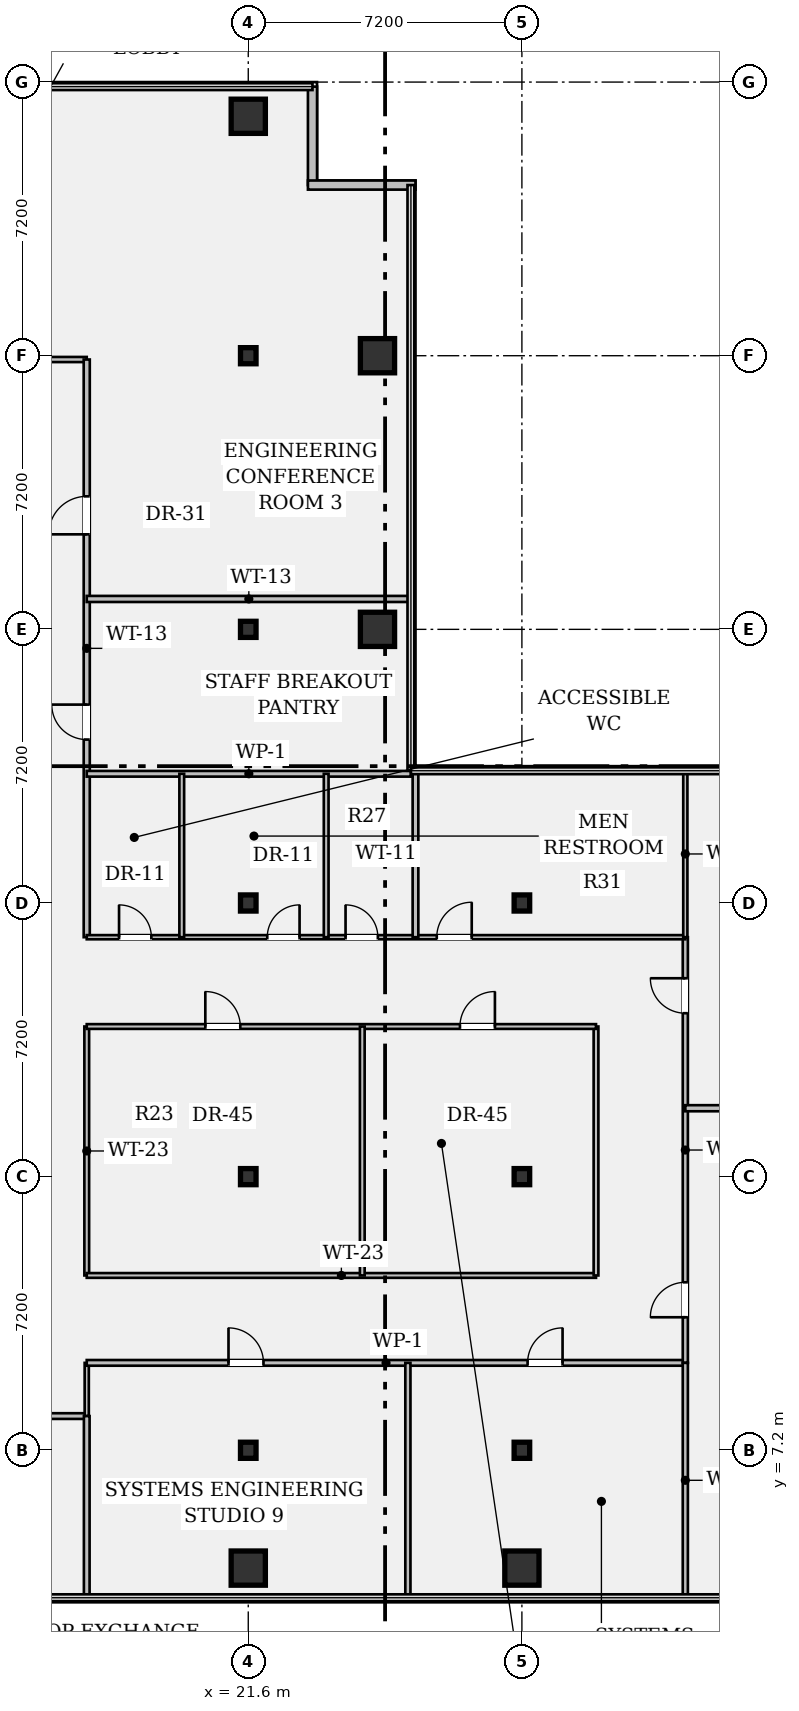
"""IFC4 building model, lengths in metres.
Left out: names, types, materials, properties, quantities, classifications, styles, units other than length and angle.
Written with IfcOpenShell. Run it as: python <this file> out.ifc"""

import sys

from ifc_helpers import new_model, si_unit, direction, frame, frame_2d, origin, origin_2d, place, context, subcontext, project, spatial, rectangle, hollow_rectangle, i_section, extrude, element, fill, save


model = new_model("IFC4")
c1 = context("Model", 3, precision=1e-05, world=origin(), true_north=direction((0.0, 1.0)))
c2 = subcontext(c1, "Body", "Model", "MODEL_VIEW")
j1 = project(units=[si_unit("LENGTHUNIT", "METRE"), si_unit("PLANEANGLEUNIT", "RADIAN")], contexts=[c1])
p1 = place(None, origin())
s1 = spatial("IfcSite", under=j1, at=p1, CompositionType="ELEMENT")
p2 = place(p1, origin())
s2 = spatial("IfcBuilding", under=s1, at=p2, CompositionType="ELEMENT")
p3 = place(p2, frame((0.0, 0.0, 140.7)))
s3 = spatial("IfcBuildingStorey", under=s2, at=p3, CompositionType="ELEMENT", Elevation=140.7)
p4 = place(p3, frame((21.6, 4.1, 0.0), z_axis=(0.0, 0.0, 1.0), x_axis=(1.0, 0.0, 0.0)))
e1 = element("IfcColumn", 1, at=p4, inside=s3, PredefinedType="COLUMN", context=c2, shape_type="SweptSolid", body=[
    extrude(hollow_rectangle(XDim=0.9, YDim=0.9, WallThickness=0.055, at=origin_2d()), origin(), (0.0, 0.0, 1.0), 3.58),
])
for number, where, z_axis, x_axis in (
    (2, (21.6, 7.2, 0.0), (0.0, 0.0, 1.0), (1.0, 0.0, 0.0)),
    (3, (21.6, 14.4, 0.0), (0.0, 0.0, 1.0), (1.0, 0.0, 0.0)),
    (4, (21.6, 21.6, 0.0), (0.0, 0.0, 1.0), (1.0, 0.0, 0.0)),
    (5, (21.6, 28.8, 0.0), (0.0, 0.0, 1.0), (1.0, 0.0, 0.0)),
    (6, (21.6, 36.0, 0.0), (0.0, 0.0, 1.0), (1.0, 0.0, 0.0)),
):
    element("IfcColumn", number, at=place(p3, frame(where, z_axis=z_axis, x_axis=x_axis)), inside=s3, PredefinedType="COLUMN", context=c2, shape_type="SweptSolid", body=[
        extrude(i_section(OverallWidth=0.409, OverallDepth=0.424, WebThickness=0.033, FlangeThickness=0.052, FilletRadius=0.018, at=origin_2d()), origin(), (0.0, 0.0, 1.0), 3.58),
    ])
for number, where, z_axis, x_axis in (
    (7, (21.6, 42.3, 0.0), (0.0, 0.0, 1.0), (1.0, 0.0, 0.0)),
    (8, (25.0, 28.8, 0.0), (0.0, 0.0, 1.0), (1.0, 0.0, 0.0)),
    (9, (25.0, 36.0, 0.0), (0.0, 0.0, 1.0), (1.0, 0.0, 0.0)),
    (10, (28.8, 4.1, 0.0), (0.0, 0.0, 1.0), (1.0, 0.0, 0.0)),
):
    element("IfcColumn", number, at=place(p3, frame(where, z_axis=z_axis, x_axis=x_axis)), inside=s3, PredefinedType="COLUMN", context=c2, shape_type="SweptSolid", body=[
        extrude(hollow_rectangle(XDim=0.9, YDim=0.9, WallThickness=0.055, at=origin_2d()), origin(), (0.0, 0.0, 1.0), 3.58),
    ])
for number, where, z_axis, x_axis in (
    (11, (28.8, 7.2, 0.0), (0.0, 0.0, 1.0), (1.0, 0.0, 0.0)),
    (12, (28.8, 14.4, 0.0), (0.0, 0.0, 1.0), (1.0, 0.0, 0.0)),
    (13, (28.8, 21.6, 0.0), (0.0, 0.0, 1.0), (1.0, 0.0, 0.0)),
):
    element("IfcColumn", number, at=place(p3, frame(where, z_axis=z_axis, x_axis=x_axis)), inside=s3, PredefinedType="COLUMN", context=c2, shape_type="SweptSolid", body=[
        extrude(i_section(OverallWidth=0.409, OverallDepth=0.424, WebThickness=0.033, FlangeThickness=0.052, FilletRadius=0.018, at=origin_2d()), origin(), (0.0, 0.0, 1.0), 3.58),
    ])
p5 = place(p3, frame((23.29, 43.08, 0.0), z_axis=(0.0, 0.0, 1.0), x_axis=(0.0, -1.0, 0.0)))
e14 = element("IfcWall", 14, at=p5, inside=s3, PredefinedType="STANDARD", context=c2, shape_type="SweptSolid", body=[
    extrude(rectangle(XDim=2.59, YDim=0.24, at=frame_2d((1.295, 0.0))), origin(), (0.0, 0.0, 1.0), 3.58),
])
p6 = place(p3, frame((23.17, 40.49, 0.0), z_axis=(0.0, 0.0, 1.0), x_axis=(1.0, 0.0, 0.0)))
e15 = element("IfcWall", 15, at=p6, inside=s3, PredefinedType="STANDARD", context=c2, shape_type="SweptSolid", body=[
    extrude(rectangle(XDim=2.83, YDim=0.24, at=frame_2d((1.415, 0.0))), origin(), (0.0, 0.0, 1.0), 3.58),
])
p7 = place(p3, frame((14.4, 8.1, 0.0), z_axis=(0.0, 0.0, 1.0), x_axis=(1.0, 0.0, 0.0)))
e16 = element("IfcWall", 16, at=p7, inside=s3, PredefinedType="PARTITIONING", context=c2, shape_type="SweptSolid", body=[
    extrude(rectangle(XDim=2.95, YDim=0.15, at=frame_2d((1.475, 0.0))), origin(), (0.0, 0.0, 1.0), 3.148),
])
p8 = place(p7, frame((0.95, 0.0, 0.0)))
e17 = element("IfcOpeningElement", 17, at=p8, cuts=e16, PredefinedType="OPENING", context=c2, shape_type="SweptSolid", body=[
    extrude(rectangle(XDim=0.92, YDim=2.15, at=frame_2d((0.46, 1.075))), frame((0.0, 0.087, 0.0), z_axis=(0.0, -1.0, 0.0), x_axis=(1.0, 0.0, 0.0)), (0.0, 0.0, 1.0), 0.174),
])
p9 = place(p3, frame((14.4, 35.9, 0.0), z_axis=(0.0, 0.0, 1.0), x_axis=(1.0, 0.0, 0.0)))
e18 = element("IfcWall", 18, at=p9, inside=s3, PredefinedType="PARTITIONING", context=c2, shape_type="SweptSolid", body=[
    extrude(rectangle(XDim=2.95, YDim=0.135, at=frame_2d((1.475, 0.0))), origin(), (0.0, 0.0, 1.0), 2.869),
])
p10 = place(p9, frame((0.95, 0.0, 0.0)))
e19 = element("IfcOpeningElement", 19, at=p10, cuts=e18, PredefinedType="OPENING", context=c2, shape_type="SweptSolid", body=[
    extrude(rectangle(XDim=1.0, YDim=2.15, at=frame_2d((0.5, 1.075))), frame((0.0, 0.08, 0.0), z_axis=(0.0, -1.0, 0.0), x_axis=(1.0, 0.0, 0.0)), (0.0, 0.0, 1.0), 0.159),
])
p11 = place(p3, frame((17.35, 8.1, 0.0), z_axis=(0.0, 0.0, 1.0), x_axis=(0.0, 1.0, 0.0)))
e20 = element("IfcWall", 20, at=p11, inside=s3, PredefinedType="PARTITIONING", context=c2, shape_type="SweptSolid", body=[
    extrude(rectangle(XDim=1.4, YDim=0.11, at=frame_2d((0.7, 0.0))), origin(), (0.0, 0.0, 1.0), 3.58),
])
p12 = place(p3, frame((17.35, 20.7, 0.0), z_axis=(0.0, 0.0, 1.0), x_axis=(0.0, 1.0, 0.0)))
e21 = element("IfcWall", 21, at=p12, inside=s3, PredefinedType="PARTITIONING", context=c2, shape_type="SweptSolid", body=[
    extrude(rectangle(XDim=15.2, YDim=0.16, at=frame_2d((7.6, 0.0))), origin(), (0.0, 0.0, 1.0), 2.869),
])
p13 = place(p12, frame((5.2, 0.0, 0.0)))
e22 = element("IfcOpeningElement", 22, at=p13, cuts=e21, PredefinedType="OPENING", context=c2, shape_type="SweptSolid", body=[
    extrude(rectangle(XDim=0.92, YDim=2.15, at=frame_2d((0.46, 1.075))), frame((0.0, 0.092, 0.0), z_axis=(0.0, -1.0, 0.0), x_axis=(1.0, 0.0, 0.0)), (0.0, 0.0, 1.0), 0.184),
])
p14 = place(p12, frame((10.6, 0.0, 0.0)))
e23 = element("IfcOpeningElement", 23, at=p14, cuts=e21, PredefinedType="OPENING", context=c2, shape_type="SweptSolid", body=[
    extrude(rectangle(XDim=1.0, YDim=2.15, at=frame_2d((0.5, 1.075))), frame((0.0, 0.092, 0.0), z_axis=(0.0, -1.0, 0.0), x_axis=(1.0, 0.0, 0.0)), (0.0, 0.0, 1.0), 0.184),
])
p15 = place(p3, frame((17.35, 9.5, 0.0), z_axis=(0.0, 0.0, 1.0), x_axis=(1.0, 0.0, 0.0)))
e24 = element("IfcWall", 24, at=p15, inside=s3, PredefinedType="PARTITIONING", context=c2, shape_type="SweptSolid", body=[
    extrude(rectangle(XDim=15.75, YDim=0.15, at=frame_2d((7.875, 0.0))), origin(), (0.0, 0.0, 1.0), 2.869),
])
p16 = place(p15, frame((3.73, 0.0, 0.0)))
e25 = element("IfcOpeningElement", 25, at=p16, cuts=e24, PredefinedType="OPENING", context=c2, shape_type="SweptSolid", body=[
    extrude(rectangle(XDim=0.92, YDim=2.15, at=frame_2d((0.46, 1.075))), frame((0.0, 0.087, 0.0), z_axis=(0.0, -1.0, 0.0), x_axis=(1.0, 0.0, 0.0)), (0.0, 0.0, 1.0), 0.174),
])
p17 = place(p15, frame((11.6, 0.0, 0.0)))
e26 = element("IfcOpeningElement", 26, at=p17, cuts=e24, PredefinedType="OPENING", context=c2, shape_type="SweptSolid", body=[
    extrude(rectangle(XDim=0.92, YDim=2.15, at=frame_2d((0.46, 1.075))), frame((0.0, 0.087, 0.0), z_axis=(0.0, -1.0, 0.0), x_axis=(1.0, 0.0, 0.0)), (0.0, 0.0, 1.0), 0.174),
])
p18 = place(p3, frame((33.1, 9.5, 0.0), z_axis=(0.0, 0.0, 1.0), x_axis=(0.0, 1.0, 0.0)))
e27 = element("IfcWall", 27, at=p18, inside=s3, PredefinedType="PARTITIONING", context=c2, shape_type="SweptSolid", body=[
    extrude(rectangle(XDim=11.2, YDim=0.135, at=frame_2d((5.6, 0.0))), origin(), (0.0, 0.0, 1.0), 2.869),
])
p19 = place(p18, frame((1.2, 0.0, 0.0)))
e28 = element("IfcOpeningElement", 28, at=p19, cuts=e27, PredefinedType="OPENING", context=c2, shape_type="SweptSolid", body=[
    extrude(rectangle(XDim=0.92, YDim=2.15, at=frame_2d((0.46, 1.075))), frame((0.0, 0.08, 0.0), z_axis=(0.0, -1.0, 0.0), x_axis=(1.0, 0.0, 0.0)), (0.0, 0.0, 1.0), 0.159),
])
p20 = place(p18, frame((9.2, 0.0, 0.0)))
e29 = element("IfcOpeningElement", 29, at=p20, cuts=e27, PredefinedType="OPENING", context=c2, shape_type="SweptSolid", body=[
    extrude(rectangle(XDim=0.92, YDim=2.15, at=frame_2d((0.46, 1.075))), frame((0.0, 0.08, 0.0), z_axis=(0.0, -1.0, 0.0), x_axis=(1.0, 0.0, 0.0)), (0.0, 0.0, 1.0), 0.159),
])
p21 = place(p3, frame((17.35, 20.7, 0.0), z_axis=(0.0, 0.0, 1.0), x_axis=(1.0, 0.0, 0.0)))
e30 = element("IfcWall", 30, at=p21, inside=s3, PredefinedType="PARTITIONING", context=c2, shape_type="SweptSolid", body=[
    extrude(rectangle(XDim=15.75, YDim=0.11, at=frame_2d((7.875, 0.0))), origin(), (0.0, 0.0, 1.0), 2.869),
])
p22 = place(p21, frame((0.85, 0.0, 0.0)))
e31 = element("IfcOpeningElement", 31, at=p22, cuts=e30, PredefinedType="OPENING", context=c2, shape_type="SweptSolid", body=[
    extrude(rectangle(XDim=0.85, YDim=2.15, at=frame_2d((0.425, 1.075))), frame((0.0, 0.067, 0.0), z_axis=(0.0, -1.0, 0.0), x_axis=(1.0, 0.0, 0.0)), (0.0, 0.0, 1.0), 0.134),
])
p23 = place(p21, frame((4.75, 0.0, 0.0)))
e32 = element("IfcOpeningElement", 32, at=p23, cuts=e30, PredefinedType="OPENING", context=c2, shape_type="SweptSolid", body=[
    extrude(rectangle(XDim=0.85, YDim=2.15, at=frame_2d((0.425, 1.075))), frame((0.0, 0.067, 0.0), z_axis=(0.0, -1.0, 0.0), x_axis=(1.0, 0.0, 0.0)), (0.0, 0.0, 1.0), 0.134),
])
p24 = place(p21, frame((6.81, 0.0, 0.0)))
e33 = element("IfcOpeningElement", 33, at=p24, cuts=e30, PredefinedType="OPENING", context=c2, shape_type="SweptSolid", body=[
    extrude(rectangle(XDim=0.85, YDim=2.15, at=frame_2d((0.425, 1.075))), frame((0.0, 0.067, 0.0), z_axis=(0.0, -1.0, 0.0), x_axis=(1.0, 0.0, 0.0)), (0.0, 0.0, 1.0), 0.134),
])
p25 = place(p21, frame((9.21, 0.0, 0.0)))
e34 = element("IfcOpeningElement", 34, at=p25, cuts=e30, PredefinedType="OPENING", context=c2, shape_type="SweptSolid", body=[
    extrude(rectangle(XDim=0.92, YDim=2.15, at=frame_2d((0.46, 1.075))), frame((0.0, 0.067, 0.0), z_axis=(0.0, -1.0, 0.0), x_axis=(1.0, 0.0, 0.0)), (0.0, 0.0, 1.0), 0.134),
])
p26 = place(p3, frame((17.35, 11.8, 0.0), z_axis=(0.0, 0.0, 1.0), x_axis=(0.0, 1.0, 0.0)))
e35 = element("IfcWall", 35, at=p26, inside=s3, PredefinedType="PARTITIONING", context=c2, shape_type="SweptSolid", body=[
    extrude(rectangle(XDim=6.55, YDim=0.125, at=frame_2d((3.275, 0.0))), origin(), (0.0, 0.0, 1.0), 2.869),
])
p27 = place(p3, frame((17.35, 11.8, 0.0), z_axis=(0.0, 0.0, 1.0), x_axis=(1.0, 0.0, 0.0)))
e36 = element("IfcWall", 36, at=p27, inside=s3, PredefinedType="PARTITIONING", context=c2, shape_type="SweptSolid", body=[
    extrude(rectangle(XDim=13.4, YDim=0.125, at=frame_2d((6.7, 0.0))), origin(), (0.0, 0.0, 1.0), 2.869),
])
p28 = place(p3, frame((30.75, 11.8, 0.0), z_axis=(0.0, 0.0, 1.0), x_axis=(0.0, 1.0, 0.0)))
e37 = element("IfcWall", 37, at=p28, inside=s3, PredefinedType="PARTITIONING", context=c2, shape_type="SweptSolid", body=[
    extrude(rectangle(XDim=6.55, YDim=0.125, at=frame_2d((3.275, 0.0))), origin(), (0.0, 0.0, 1.0), 2.869),
])
p29 = place(p3, frame((17.35, 18.35, 0.0), z_axis=(0.0, 0.0, 1.0), x_axis=(1.0, 0.0, 0.0)))
e38 = element("IfcWall", 38, at=p29, inside=s3, PredefinedType="PARTITIONING", context=c2, shape_type="SweptSolid", body=[
    extrude(rectangle(XDim=13.4, YDim=0.125, at=frame_2d((6.7, 0.0))), origin(), (0.0, 0.0, 1.0), 2.869),
])
p30 = place(p29, frame((3.12, 0.0, 0.0)))
e39 = element("IfcOpeningElement", 39, at=p30, cuts=e38, PredefinedType="OPENING", context=c2, shape_type="SweptSolid", body=[
    extrude(rectangle(XDim=0.92, YDim=2.15, at=frame_2d((0.46, 1.075))), frame((0.0, 0.074, 0.0), z_axis=(0.0, -1.0, 0.0), x_axis=(1.0, 0.0, 0.0)), (0.0, 0.0, 1.0), 0.149),
])
p31 = place(p29, frame((9.82, 0.0, 0.0)))
e40 = element("IfcOpeningElement", 40, at=p31, cuts=e38, PredefinedType="OPENING", context=c2, shape_type="SweptSolid", body=[
    extrude(rectangle(XDim=0.92, YDim=2.15, at=frame_2d((0.46, 1.075))), frame((0.0, 0.074, 0.0), z_axis=(0.0, -1.0, 0.0), x_axis=(1.0, 0.0, 0.0)), (0.0, 0.0, 1.0), 0.149),
])
p32 = place(p3, frame((24.6, 11.8, 0.0), z_axis=(0.0, 0.0, 1.0), x_axis=(0.0, 1.0, 0.0)))
e41 = element("IfcWall", 41, at=p32, inside=s3, PredefinedType="PARTITIONING", context=c2, shape_type="SweptSolid", body=[
    extrude(rectangle(XDim=6.55, YDim=0.125, at=frame_2d((3.275, 0.0))), origin(), (0.0, 0.0, 1.0), 2.869),
])
p33 = place(p3, frame((17.35, 25.0, 0.0), z_axis=(0.0, 0.0, 1.0), x_axis=(1.0, 0.0, 0.0)))
e42 = element("IfcWall", 42, at=p33, inside=s3, PredefinedType="PARTITIONING", context=c2, shape_type="SweptSolid", body=[
    extrude(rectangle(XDim=8.53, YDim=0.15, at=frame_2d((4.265, 0.0))), origin(), (0.0, 0.0, 1.0), 2.869),
])
for number, where, z_axis, x_axis in (
    (43, (19.85, 20.7, 0.0), (0.0, 0.0, 1.0), (0.0, 1.0, 0.0)),
    (44, (23.65, 20.7, 0.0), (0.0, 0.0, 1.0), (0.0, 1.0, 0.0)),
):
    element("IfcWall", number, at=place(p3, frame(where, z_axis=z_axis, x_axis=x_axis)), inside=s3, PredefinedType="PARTITIONING", context=c2, shape_type="SweptSolid", body=[
        extrude(rectangle(XDim=4.3, YDim=0.125, at=frame_2d((2.15, 0.0))), origin(), (0.0, 0.0, 1.0), 2.869),
    ])
p34 = place(p3, frame((17.35, 29.6, 0.0), z_axis=(0.0, 0.0, 1.0), x_axis=(1.0, 0.0, 0.0)))
e45 = element("IfcWall", 45, at=p34, inside=s3, PredefinedType="PARTITIONING", context=c2, shape_type="SweptSolid", body=[
    extrude(rectangle(XDim=8.53, YDim=0.16, at=frame_2d((4.265, 0.0))), origin(), (0.0, 0.0, 1.0), 2.869),
])
p35 = place(p3, frame((26.0, 20.7, 0.0), z_axis=(0.0, 0.0, 1.0), x_axis=(0.0, 1.0, 0.0)))
e46 = element("IfcWall", 46, at=p35, inside=s3, PredefinedType="PARTITIONING", context=c2, shape_type="SweptSolid", body=[
    extrude(rectangle(XDim=4.38, YDim=0.15, at=frame_2d((2.19, 0.0))), origin(), (0.0, 0.0, 1.0), 2.869),
])
p36 = place(p3, frame((33.1, 3.32, 0.0), z_axis=(0.0, 0.0, 1.0), x_axis=(0.0, 1.0, 0.0)))
e47 = element("IfcWall", 47, at=p36, inside=s3, PredefinedType="PARTITIONING", context=c2, shape_type="SweptSolid", body=[
    extrude(rectangle(XDim=6.18, YDim=0.135, at=frame_2d((3.09, 0.0))), origin(), (0.0, 0.0, 1.0), 2.869),
])
p37 = place(p3, frame((33.1, 20.7, 0.0), z_axis=(0.0, 0.0, 1.0), x_axis=(0.0, 1.0, 0.0)))
e48 = element("IfcWall", 48, at=p37, inside=s3, PredefinedType="PARTITIONING", context=c2, shape_type="SweptSolid", body=[
    extrude(rectangle(XDim=4.38, YDim=0.11, at=frame_2d((2.19, 0.0))), origin(), (0.0, 0.0, 1.0), 2.869),
])
p38 = place(p3, frame((33.1, 16.2, 0.0), z_axis=(0.0, 0.0, 1.0), x_axis=(1.0, 0.0, 0.0)))
e49 = element("IfcWall", 49, at=p38, inside=s3, PredefinedType="PARTITIONING", context=c2, shape_type="SweptSolid", body=[
    extrude(rectangle(XDim=13.98, YDim=0.16, at=frame_2d((6.99, 0.0))), origin(), (0.0, 0.0, 1.0), 2.869),
])
p39 = place(p3, frame((17.35, 3.32, 0.0), z_axis=(0.0, 0.0, 1.0), x_axis=(0.0, 1.0, 0.0)))
e50 = element("IfcWall", 50, at=p39, inside=s3, PredefinedType="PARTITIONING", context=c2, shape_type="SweptSolid", body=[
    extrude(rectangle(XDim=4.78, YDim=0.15, at=frame_2d((2.39, 0.0))), origin(), (0.0, 0.0, 1.0), 2.869),
])
p40 = place(p3, frame((25.8, 3.32, 0.0), z_axis=(0.0, 0.0, 1.0), x_axis=(0.0, 1.0, 0.0)))
e51 = element("IfcWall", 51, at=p40, inside=s3, PredefinedType="PARTITIONING", context=c2, shape_type="SweptSolid", body=[
    extrude(rectangle(XDim=6.18, YDim=0.135, at=frame_2d((3.09, 0.0))), origin(), (0.0, 0.0, 1.0), 2.869),
])
p41 = place(p30, origin())
e52 = element("IfcDoor", 52, at=p41, inside=s3, OperationType="SINGLE_SWING_LEFT", PredefinedType="DOOR", context=c2, shape_type="SweptSolid", body=[
    extrude(rectangle(XDim=0.92, YDim=2.15, at=frame_2d((0.46, 1.075))), frame((0.0, 0.025, 0.0), z_axis=(0.0, -1.0, 0.0), x_axis=(1.0, 0.0, 0.0)), (0.0, 0.0, 1.0), 0.05),
])
fill(e39, e52)
p42 = place(p31, origin())
e53 = element("IfcDoor", 53, at=p42, inside=s3, OperationType="SINGLE_SWING_RIGHT", PredefinedType="DOOR", context=c2, shape_type="SweptSolid", body=[
    extrude(rectangle(XDim=0.92, YDim=2.15, at=frame_2d((0.46, 1.075))), frame((0.0, 0.025, 0.0), z_axis=(0.0, -1.0, 0.0), x_axis=(1.0, 0.0, 0.0)), (0.0, 0.0, 1.0), 0.05),
])
fill(e40, e53)
p43 = place(p22, origin())
e54 = element("IfcDoor", 54, at=p43, inside=s3, OperationType="SINGLE_SWING_LEFT", PredefinedType="DOOR", context=c2, shape_type="SweptSolid", body=[
    extrude(rectangle(XDim=0.85, YDim=2.15, at=frame_2d((0.425, 1.075))), frame((0.0, 0.025, 0.0), z_axis=(0.0, -1.0, 0.0), x_axis=(1.0, 0.0, 0.0)), (0.0, 0.0, 1.0), 0.05),
])
fill(e31, e54)
p44 = place(p23, origin())
e55 = element("IfcDoor", 55, at=p44, inside=s3, OperationType="SINGLE_SWING_RIGHT", PredefinedType="DOOR", context=c2, shape_type="SweptSolid", body=[
    extrude(rectangle(XDim=0.85, YDim=2.15, at=frame_2d((0.425, 1.075))), frame((0.0, 0.025, 0.0), z_axis=(0.0, -1.0, 0.0), x_axis=(1.0, 0.0, 0.0)), (0.0, 0.0, 1.0), 0.05),
])
fill(e32, e55)
p45 = place(p24, origin())
e56 = element("IfcDoor", 56, at=p45, inside=s3, OperationType="SINGLE_SWING_LEFT", PredefinedType="DOOR", context=c2, shape_type="SweptSolid", body=[
    extrude(rectangle(XDim=0.85, YDim=2.15, at=frame_2d((0.425, 1.075))), frame((0.0, 0.025, 0.0), z_axis=(0.0, -1.0, 0.0), x_axis=(1.0, 0.0, 0.0)), (0.0, 0.0, 1.0), 0.05),
])
fill(e33, e56)
p46 = place(p13, origin())
e57 = element("IfcDoor", 57, at=p46, inside=s3, OperationType="SINGLE_SWING_RIGHT", PredefinedType="DOOR", context=c2, shape_type="SweptSolid", body=[
    extrude(rectangle(XDim=0.92, YDim=2.15, at=frame_2d((0.46, 1.075))), frame((0.0, 0.025, 0.0), z_axis=(0.0, -1.0, 0.0), x_axis=(1.0, 0.0, 0.0)), (0.0, 0.0, 1.0), 0.05),
])
fill(e22, e57)
p47 = place(p14, origin())
e58 = element("IfcDoor", 58, at=p47, inside=s3, OperationType="SINGLE_SWING_LEFT", PredefinedType="DOOR", context=c2, shape_type="SweptSolid", body=[
    extrude(rectangle(XDim=1.0, YDim=2.15, at=frame_2d((0.5, 1.075))), frame((0.0, 0.025, 0.0), z_axis=(0.0, -1.0, 0.0), x_axis=(1.0, 0.0, 0.0)), (0.0, 0.0, 1.0), 0.05),
])
fill(e23, e58)
p48 = place(p25, origin())
e59 = element("IfcDoor", 59, at=p48, inside=s3, OperationType="SINGLE_SWING_RIGHT", PredefinedType="DOOR", context=c2, shape_type="SweptSolid", body=[
    extrude(rectangle(XDim=0.92, YDim=2.15, at=frame_2d((0.46, 1.075))), frame((0.0, 0.025, 0.0), z_axis=(0.0, -1.0, 0.0), x_axis=(1.0, 0.0, 0.0)), (0.0, 0.0, 1.0), 0.05),
])
fill(e34, e59)
p49 = place(p19, origin())
e60 = element("IfcDoor", 60, at=p49, inside=s3, OperationType="SINGLE_SWING_LEFT", PredefinedType="DOOR", context=c2, shape_type="SweptSolid", body=[
    extrude(rectangle(XDim=0.92, YDim=2.15, at=frame_2d((0.46, 1.075))), frame((0.0, 0.025, 0.0), z_axis=(0.0, -1.0, 0.0), x_axis=(1.0, 0.0, 0.0)), (0.0, 0.0, 1.0), 0.05),
])
fill(e28, e60)
p50 = place(p20, origin())
e61 = element("IfcDoor", 61, at=p50, inside=s3, OperationType="SINGLE_SWING_RIGHT", PredefinedType="DOOR", context=c2, shape_type="SweptSolid", body=[
    extrude(rectangle(XDim=0.92, YDim=2.15, at=frame_2d((0.46, 1.075))), frame((0.0, 0.025, 0.0), z_axis=(0.0, -1.0, 0.0), x_axis=(1.0, 0.0, 0.0)), (0.0, 0.0, 1.0), 0.05),
])
fill(e29, e61)
p51 = place(p16, origin())
e62 = element("IfcDoor", 62, at=p51, inside=s3, OperationType="SINGLE_SWING_LEFT", PredefinedType="DOOR", context=c2, shape_type="SweptSolid", body=[
    extrude(rectangle(XDim=0.92, YDim=2.15, at=frame_2d((0.46, 1.075))), frame((0.0, 0.025, 0.0), z_axis=(0.0, -1.0, 0.0), x_axis=(1.0, 0.0, 0.0)), (0.0, 0.0, 1.0), 0.05),
])
fill(e25, e62)
p52 = place(p17, origin())
e63 = element("IfcDoor", 63, at=p52, inside=s3, OperationType="SINGLE_SWING_RIGHT", PredefinedType="DOOR", context=c2, shape_type="SweptSolid", body=[
    extrude(rectangle(XDim=0.92, YDim=2.15, at=frame_2d((0.46, 1.075))), frame((0.0, 0.025, 0.0), z_axis=(0.0, -1.0, 0.0), x_axis=(1.0, 0.0, 0.0)), (0.0, 0.0, 1.0), 0.05),
])
fill(e26, e63)
save(model, sys.argv[1])
